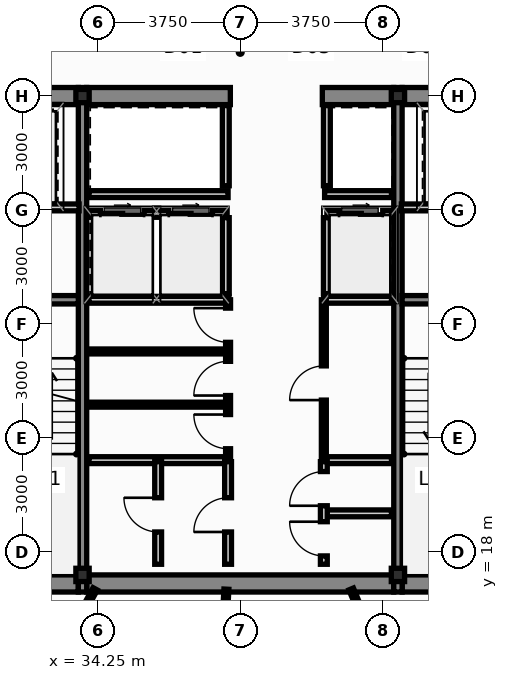
"""IFC4 building model, lengths in metres.
Left out: names, types, materials, properties, quantities, classifications, styles, units other than length and angle.
Written with IfcOpenShell. Run it as: python <this file> out.ifc"""

import sys

from ifc_helpers import new_model, si_unit, direction, frame, frame_2d, origin, origin_2d, place, context, subcontext, project, spatial, rectangle, hollow_rectangle, extrude, source, transform, mapped, element, fill, save


model = new_model("IFC4")
c1 = context("Model", 3, precision=1e-05, world=origin(), true_north=direction((0.0, 1.0)))
c2 = subcontext(c1, "Body", "Model", "MODEL_VIEW")
j1 = project(units=[si_unit("LENGTHUNIT", "METRE"), si_unit("PLANEANGLEUNIT", "RADIAN")], contexts=[c1])
p1 = place(None, origin())
s1 = spatial("IfcSite", under=j1, at=p1, CompositionType="ELEMENT")
p2 = place(p1, origin())
s2 = spatial("IfcBuilding", under=s1, at=p2, CompositionType="ELEMENT")
p3 = place(p2, frame((0.0, 0.0, 191.35)))
s3 = spatial("IfcBuildingStorey", under=s2, at=p3, CompositionType="ELEMENT", Elevation=191.35)
m1 = source(origin(), c2, "Body", "SweptSolid", [
    extrude(hollow_rectangle(XDim=0.35, YDim=0.35, WallThickness=0.016, at=origin_2d()), origin(), (0.0, 0.0, 1.0), 3.65),
])
for number, where, z_axis, x_axis in (
    (1, (33.85, 17.4, 0.0), (0.0, 0.0, 1.0), (1.0, 0.0, 0.0)),
    (2, (42.15, 17.4, 0.0), (0.0, 0.0, 1.0), (1.0, 0.0, 0.0)),
    (3, (33.85, 30.0, 0.0), (0.0, 0.0, 1.0), (1.0, 0.0, 0.0)),
    (4, (42.15, 30.0, 0.0), (0.0, 0.0, 1.0), (1.0, 0.0, 0.0)),
):
    element("IfcColumn", number, at=place(p3, frame(where, z_axis=z_axis, x_axis=x_axis)), inside=s3, PredefinedType="COLUMN", context=c2, shape_type="MappedRepresentation", body=[
        mapped(m1, transform((0.0, 0.0, 0.0), scale=1.0)),
    ])
p4 = place(p3, frame((30.84, 17.175, 0.0), z_axis=(0.0, 0.0, 1.0), x_axis=(1.0, 0.0, 0.0)))
e5 = element("IfcWall", 5, at=p4, inside=s3, PredefinedType="SHEAR", context=c2, shape_type="SweptSolid", body=[
    extrude(rectangle(XDim=2.9, YDim=0.45, at=frame_2d((1.45, 0.0))), origin(), (0.0, 0.0, 1.0), 3.65),
])
p5 = place(p3, frame((33.96, 17.175, 0.0), z_axis=(0.0, 0.0, 1.0), x_axis=(1.0, 0.0, 0.0)))
e6 = element("IfcWall", 6, at=p5, inside=s3, PredefinedType="SHEAR", context=c2, shape_type="SweptSolid", body=[
    extrude(rectangle(XDim=8.08, YDim=0.45, at=frame_2d((4.04, 0.0))), origin(), (0.0, 0.0, 1.0), 3.65),
])
for number, where, z_axis, x_axis in (
    (7, (42.26, 17.175, 0.0), (0.0, 0.0, 1.0), (1.0, 0.0, 0.0)),
    (8, (30.84, 30.0, 0.0), (0.0, 0.0, 1.0), (1.0, 0.0, 0.0)),
):
    element("IfcWall", number, at=place(p3, frame(where, z_axis=z_axis, x_axis=x_axis)), inside=s3, PredefinedType="SHEAR", context=c2, shape_type="SweptSolid", body=[
        extrude(rectangle(XDim=2.9, YDim=0.45, at=frame_2d((1.45, 0.0))), origin(), (0.0, 0.0, 1.0), 3.65),
    ])
p6 = place(p3, frame((33.96, 30.0, 0.0), z_axis=(0.0, 0.0, 1.0), x_axis=(1.0, 0.0, 0.0)))
e9 = element("IfcWall", 9, at=p6, inside=s3, PredefinedType="SHEAR", context=c2, shape_type="SweptSolid", body=[
    extrude(rectangle(XDim=3.78, YDim=0.45, at=frame_2d((1.89, 0.0))), origin(), (0.0, 0.0, 1.0), 3.65),
])
p7 = place(p3, frame((40.16, 30.0, 0.0), z_axis=(0.0, 0.0, 1.0), x_axis=(1.0, 0.0, 0.0)))
e10 = element("IfcWall", 10, at=p7, inside=s3, PredefinedType="SHEAR", context=c2, shape_type="SweptSolid", body=[
    extrude(rectangle(XDim=1.88, YDim=0.45, at=frame_2d((0.94, 0.0))), origin(), (0.0, 0.0, 1.0), 3.65),
])
p8 = place(p3, frame((42.26, 30.0, 0.0), z_axis=(0.0, 0.0, 1.0), x_axis=(1.0, 0.0, 0.0)))
e11 = element("IfcWall", 11, at=p8, inside=s3, PredefinedType="SHEAR", context=c2, shape_type="SweptSolid", body=[
    extrude(rectangle(XDim=2.9, YDim=0.45, at=frame_2d((1.45, 0.0))), origin(), (0.0, 0.0, 1.0), 3.65),
])
for number, where, z_axis, x_axis in (
    (12, (33.85, 16.95, 0.0), (0.0, 0.0, 1.0), (0.0, 1.0, 0.0)),
    (13, (42.15, 16.95, 0.0), (0.0, 0.0, 1.0), (0.0, 1.0, 0.0)),
):
    element("IfcWall", number, at=place(p3, frame(where, z_axis=z_axis, x_axis=x_axis)), inside=s3, PredefinedType="SHEAR", context=c2, shape_type="SweptSolid", body=[
        extrude(rectangle(XDim=13.275, YDim=0.22, at=frame_2d((6.638, 0.0))), origin(), (0.0, 0.0, 1.0), 3.65),
    ])
for number, where, z_axis, x_axis in (
    (14, (30.84, 24.64, 0.0), (0.0, 0.0, 1.0), (1.0, 0.0, 0.0)),
    (15, (42.26, 24.64, 0.0), (0.0, 0.0, 1.0), (1.0, 0.0, 0.0)),
):
    element("IfcWall", number, at=place(p3, frame(where, z_axis=z_axis, x_axis=x_axis)), inside=s3, PredefinedType="SHEAR", context=c2, shape_type="SweptSolid", body=[
        extrude(rectangle(XDim=2.9, YDim=0.22, at=frame_2d((1.45, 0.0))), origin(), (0.0, 0.0, 1.0), 3.65),
    ])
p9 = place(p3, frame((34.02, 26.9, 0.0), z_axis=(0.0, 0.0, 1.0), x_axis=(1.0, 0.0, 0.0)))
e16 = element("IfcWall", 16, at=p9, inside=s3, PredefinedType="PARTITIONING", context=c2, shape_type="SweptSolid", body=[
    extrude(rectangle(XDim=3.6, YDim=0.18, at=frame_2d((1.8, 0.0))), origin(), (0.0, 0.0, 1.0), 3.4),
])
p10 = place(p9, frame((0.3, 0.0, 0.0)))
e17 = element("IfcOpeningElement", 17, at=p10, cuts=e16, PredefinedType="OPENING", context=c2, shape_type="SweptSolid", body=[
    extrude(rectangle(XDim=1.15, YDim=2.2, at=frame_2d((0.575, 1.1))), frame((0.0, 0.102, 0.0), z_axis=(0.0, -1.0, 0.0), x_axis=(1.0, 0.0, 0.0)), (0.0, 0.0, 1.0), 0.204),
])
p11 = place(p9, frame((2.1, 0.0, 0.0)))
e18 = element("IfcOpeningElement", 18, at=p11, cuts=e16, PredefinedType="OPENING", context=c2, shape_type="SweptSolid", body=[
    extrude(rectangle(XDim=1.15, YDim=2.2, at=frame_2d((0.575, 1.1))), frame((0.0, 0.102, 0.0), z_axis=(0.0, -1.0, 0.0), x_axis=(1.0, 0.0, 0.0)), (0.0, 0.0, 1.0), 0.204),
])
p12 = place(p3, frame((40.28, 26.9, 0.0), z_axis=(0.0, 0.0, 1.0), x_axis=(1.0, 0.0, 0.0)))
e19 = element("IfcWall", 19, at=p12, inside=s3, PredefinedType="PARTITIONING", context=c2, shape_type="SweptSolid", body=[
    extrude(rectangle(XDim=1.7, YDim=0.18, at=frame_2d((0.85, 0.0))), origin(), (0.0, 0.0, 1.0), 3.4),
])
p13 = place(p12, frame((0.32, 0.0, 0.0)))
e20 = element("IfcOpeningElement", 20, at=p13, cuts=e19, PredefinedType="OPENING", context=c2, shape_type="SweptSolid", body=[
    extrude(rectangle(XDim=1.15, YDim=2.2, at=frame_2d((0.575, 1.1))), frame((0.0, 0.102, 0.0), z_axis=(0.0, -1.0, 0.0), x_axis=(1.0, 0.0, 0.0)), (0.0, 0.0, 1.0), 0.204),
])
for number, where, z_axis, x_axis in (
    (21, (37.62, 24.8, 0.0), (0.0, 0.0, 1.0), (0.0, 1.0, 0.0)),
    (22, (40.28, 24.8, 0.0), (0.0, 0.0, 1.0), (0.0, 1.0, 0.0)),
):
    element("IfcWall", number, at=place(p3, frame(where, z_axis=z_axis, x_axis=x_axis)), inside=s3, PredefinedType="PARTITIONING", context=c2, shape_type="SweptSolid", body=[
        extrude(rectangle(XDim=2.0, YDim=0.18, at=frame_2d((1.0, 0.0))), origin(), (0.0, 0.0, 1.0), 3.4),
    ])
p14 = place(p3, frame((34.02, 24.64, 0.0), z_axis=(0.0, 0.0, 1.0), x_axis=(1.0, 0.0, 0.0)))
e23 = element("IfcWall", 23, at=p14, inside=s3, PredefinedType="PARTITIONING", context=c2, shape_type="SweptSolid", body=[
    extrude(rectangle(XDim=3.68, YDim=0.18, at=frame_2d((1.84, 0.0))), origin(), (0.0, 0.0, 1.0), 3.4),
])
p15 = place(p3, frame((40.2, 24.64, 0.0), z_axis=(0.0, 0.0, 1.0), x_axis=(1.0, 0.0, 0.0)))
e24 = element("IfcWall", 24, at=p15, inside=s3, PredefinedType="PARTITIONING", context=c2, shape_type="SweptSolid", body=[
    extrude(rectangle(XDim=1.78, YDim=0.18, at=frame_2d((0.89, 0.0))), origin(), (0.0, 0.0, 1.0), 3.4),
])
p16 = place(p3, frame((34.02, 27.42, 0.0), z_axis=(0.0, 0.0, 1.0), x_axis=(1.0, 0.0, 0.0)))
e25 = element("IfcWall", 25, at=p16, inside=s3, PredefinedType="PARTITIONING", context=c2, shape_type="SweptSolid", body=[
    extrude(rectangle(XDim=3.66, YDim=0.18, at=frame_2d((1.83, 0.0))), origin(), (0.0, 0.0, 1.0), 3.4),
])
p17 = place(p3, frame((40.22, 27.42, 0.0), z_axis=(0.0, 0.0, 1.0), x_axis=(1.0, 0.0, 0.0)))
e26 = element("IfcWall", 26, at=p17, inside=s3, PredefinedType="PARTITIONING", context=c2, shape_type="SweptSolid", body=[
    extrude(rectangle(XDim=1.76, YDim=0.18, at=frame_2d((0.88, 0.0))), origin(), (0.0, 0.0, 1.0), 3.4),
])
for number, where, z_axis, x_axis in (
    (27, (37.62, 27.64, 0.0), (0.0, 0.0, 1.0), (0.0, 1.0, 0.0)),
    (28, (40.28, 27.64, 0.0), (0.0, 0.0, 1.0), (0.0, 1.0, 0.0)),
):
    element("IfcWall", number, at=place(p3, frame(where, z_axis=z_axis, x_axis=x_axis)), inside=s3, PredefinedType="PARTITIONING", context=c2, shape_type="SweptSolid", body=[
        extrude(rectangle(XDim=2.11, YDim=0.18, at=frame_2d((1.055, 0.0))), origin(), (0.0, 0.0, 1.0), 3.4),
    ])
for number, where, z_axis, x_axis in (
    (29, (30.86, 27.07, 0.0), (0.0, 0.0, 1.0), (1.0, 0.0, 0.0)),
    (30, (42.24, 27.07, 0.0), (0.0, 0.0, 1.0), (1.0, 0.0, 0.0)),
):
    element("IfcWall", number, at=place(p3, frame(where, z_axis=z_axis, x_axis=x_axis)), inside=s3, PredefinedType="PARTITIONING", context=c2, shape_type="SweptSolid", body=[
        extrude(rectangle(XDim=2.9, YDim=0.18, at=frame_2d((1.45, 0.0))), origin(), (0.0, 0.0, 1.0), 3.4),
    ])
p18 = place(p3, frame((34.02, 20.42, 0.0), z_axis=(0.0, 0.0, 1.0), x_axis=(1.0, 0.0, 0.0)))
e31 = element("IfcWall", 31, at=p18, inside=s3, PredefinedType="PARTITIONING", context=c2, shape_type="SweptSolid", body=[
    extrude(rectangle(XDim=3.64, YDim=0.18, at=frame_2d((1.82, 0.0))), origin(), (0.0, 0.0, 1.0), 3.4),
])
p19 = place(p3, frame((40.22, 20.42, 0.0), z_axis=(0.0, 0.0, 1.0), x_axis=(1.0, 0.0, 0.0)))
e32 = element("IfcWall", 32, at=p19, inside=s3, PredefinedType="PARTITIONING", context=c2, shape_type="SweptSolid", body=[
    extrude(rectangle(XDim=1.76, YDim=0.18, at=frame_2d((0.88, 0.0))), origin(), (0.0, 0.0, 1.0), 3.4),
])
for number, where, z_axis, x_axis in (
    (33, (34.02, 21.88, 0.0), (0.0, 0.0, 1.0), (1.0, 0.0, 0.0)),
    (34, (34.02, 23.28, 0.0), (0.0, 0.0, 1.0), (1.0, 0.0, 0.0)),
):
    element("IfcWall", number, at=place(p3, frame(where, z_axis=z_axis, x_axis=x_axis)), inside=s3, PredefinedType="PARTITIONING", context=c2, shape_type="SweptSolid", body=[
        extrude(rectangle(XDim=3.58, YDim=0.13, at=frame_2d((1.79, 0.0))), origin(), (0.0, 0.0, 1.0), 3.4),
    ])
p20 = place(p3, frame((37.68, 20.5, 0.0), z_axis=(0.0, 0.0, 1.0), x_axis=(0.0, 1.0, 0.0)))
e35 = element("IfcWall", 35, at=p20, inside=s3, PredefinedType="PARTITIONING", context=c2, shape_type="SweptSolid", body=[
    extrude(rectangle(XDim=4.14, YDim=0.13, at=frame_2d((2.07, 0.0))), origin(), (0.0, 0.0, 1.0), 3.4),
])
p21 = place(p20, frame((0.22, 0.0, 0.0)))
e36 = element("IfcOpeningElement", 36, at=p21, cuts=e35, PredefinedType="OPENING", context=c2, shape_type="SweptSolid", body=[
    extrude(rectangle(XDim=0.9, YDim=2.1, at=frame_2d((0.45, 1.05))), frame((0.0, 0.077, 0.0), z_axis=(0.0, -1.0, 0.0), x_axis=(1.0, 0.0, 0.0)), (0.0, 0.0, 1.0), 0.154),
])
p22 = place(p20, frame((1.62, 0.0, 0.0)))
e37 = element("IfcOpeningElement", 37, at=p22, cuts=e35, PredefinedType="OPENING", context=c2, shape_type="SweptSolid", body=[
    extrude(rectangle(XDim=0.9, YDim=2.1, at=frame_2d((0.45, 1.05))), frame((0.0, 0.077, 0.0), z_axis=(0.0, -1.0, 0.0), x_axis=(1.0, 0.0, 0.0)), (0.0, 0.0, 1.0), 0.154),
])
p23 = place(p20, frame((3.02, 0.0, 0.0)))
e38 = element("IfcOpeningElement", 38, at=p23, cuts=e35, PredefinedType="OPENING", context=c2, shape_type="SweptSolid", body=[
    extrude(rectangle(XDim=0.9, YDim=2.1, at=frame_2d((0.45, 1.05))), frame((0.0, 0.077, 0.0), z_axis=(0.0, -1.0, 0.0), x_axis=(1.0, 0.0, 0.0)), (0.0, 0.0, 1.0), 0.154),
])
p24 = place(p3, frame((40.2, 20.5, 0.0), z_axis=(0.0, 0.0, 1.0), x_axis=(0.0, 1.0, 0.0)))
e39 = element("IfcWall", 39, at=p24, inside=s3, PredefinedType="PARTITIONING", context=c2, shape_type="SweptSolid", body=[
    extrude(rectangle(XDim=4.14, YDim=0.13, at=frame_2d((2.07, 0.0))), origin(), (0.0, 0.0, 1.0), 3.4),
])
p25 = place(p24, frame((1.5, 0.0, 0.0)))
e40 = element("IfcOpeningElement", 40, at=p25, cuts=e39, PredefinedType="OPENING", context=c2, shape_type="SweptSolid", body=[
    extrude(rectangle(XDim=0.9, YDim=2.1, at=frame_2d((0.45, 1.05))), frame((0.0, 0.077, 0.0), z_axis=(0.0, -1.0, 0.0), x_axis=(1.0, 0.0, 0.0)), (0.0, 0.0, 1.0), 0.154),
])
p26 = place(p3, frame((35.84, 17.68, 0.0), z_axis=(0.0, 0.0, 1.0), x_axis=(0.0, 1.0, 0.0)))
e41 = element("IfcWall", 41, at=p26, inside=s3, PredefinedType="PARTITIONING", context=c2, shape_type="SweptSolid", body=[
    extrude(rectangle(XDim=2.7, YDim=0.18, at=frame_2d((1.35, 0.0))), origin(), (0.0, 0.0, 1.0), 3.4),
])
p27 = place(p26, frame((0.85, 0.0, 0.0)))
e42 = element("IfcOpeningElement", 42, at=p27, cuts=e41, PredefinedType="OPENING", context=c2, shape_type="SweptSolid", body=[
    extrude(rectangle(XDim=0.9, YDim=2.1, at=frame_2d((0.45, 1.05))), frame((0.0, 0.102, 0.0), z_axis=(0.0, -1.0, 0.0), x_axis=(1.0, 0.0, 0.0)), (0.0, 0.0, 1.0), 0.204),
])
p28 = place(p3, frame((37.68, 17.68, 0.0), z_axis=(0.0, 0.0, 1.0), x_axis=(0.0, 1.0, 0.0)))
e43 = element("IfcWall", 43, at=p28, inside=s3, PredefinedType="PARTITIONING", context=c2, shape_type="SweptSolid", body=[
    extrude(rectangle(XDim=2.7, YDim=0.18, at=frame_2d((1.35, 0.0))), origin(), (0.0, 0.0, 1.0), 3.4),
])
p29 = place(p28, frame((0.85, 0.0, 0.0)))
e44 = element("IfcOpeningElement", 44, at=p29, cuts=e43, PredefinedType="OPENING", context=c2, shape_type="SweptSolid", body=[
    extrude(rectangle(XDim=0.9, YDim=2.1, at=frame_2d((0.45, 1.05))), frame((0.0, 0.102, 0.0), z_axis=(0.0, -1.0, 0.0), x_axis=(1.0, 0.0, 0.0)), (0.0, 0.0, 1.0), 0.204),
])
p30 = place(p3, frame((40.28, 19.02, 0.0), z_axis=(0.0, 0.0, 1.0), x_axis=(1.0, 0.0, 0.0)))
e45 = element("IfcWall", 45, at=p30, inside=s3, PredefinedType="PARTITIONING", context=c2, shape_type="SweptSolid", body=[
    extrude(rectangle(XDim=1.7, YDim=0.18, at=frame_2d((0.85, 0.0))), origin(), (0.0, 0.0, 1.0), 3.4),
])
p31 = place(p3, frame((40.2, 17.68, 0.0), z_axis=(0.0, 0.0, 1.0), x_axis=(0.0, 1.0, 0.0)))
e46 = element("IfcWall", 46, at=p31, inside=s3, PredefinedType="PARTITIONING", context=c2, shape_type="SweptSolid", body=[
    extrude(rectangle(XDim=2.7, YDim=0.18, at=frame_2d((1.35, 0.0))), origin(), (0.0, 0.0, 1.0), 3.4),
])
p32 = place(p31, frame((0.22, 0.0, 0.0)))
e47 = element("IfcOpeningElement", 47, at=p32, cuts=e46, PredefinedType="OPENING", context=c2, shape_type="SweptSolid", body=[
    extrude(rectangle(XDim=0.9, YDim=2.1, at=frame_2d((0.45, 1.05))), frame((0.0, 0.102, 0.0), z_axis=(0.0, -1.0, 0.0), x_axis=(1.0, 0.0, 0.0)), (0.0, 0.0, 1.0), 0.204),
])
p33 = place(p31, frame((1.54, 0.0, 0.0)))
e48 = element("IfcOpeningElement", 48, at=p33, cuts=e46, PredefinedType="OPENING", context=c2, shape_type="SweptSolid", body=[
    extrude(rectangle(XDim=0.9, YDim=2.1, at=frame_2d((0.45, 1.05))), frame((0.0, 0.102, 0.0), z_axis=(0.0, -1.0, 0.0), x_axis=(1.0, 0.0, 0.0)), (0.0, 0.0, 1.0), 0.204),
])
p34 = place(p3, frame((28.644, 6.909, 0.0), z_axis=(0.0, 0.0, 1.0), x_axis=(0.479998822193, 0.877269132418, 0.0)))
e49 = element("IfcWall", 49, at=p34, inside=s3, PredefinedType="PARTITIONING", context=c2, shape_type="SweptSolid", body=[
    extrude(rectangle(XDim=11.542, YDim=0.13, at=frame_2d((5.771, 0.0))), origin(), (0.0, 0.0, 1.0), 3.4),
])
p35 = place(p34, frame((5.347, 0.0, 0.0)))
e50 = element("IfcOpeningElement", 50, at=p35, cuts=e49, PredefinedType="OPENING", context=c2, shape_type="SweptSolid", body=[
    extrude(rectangle(XDim=0.96, YDim=2.15, at=frame_2d((0.48, 1.075))), frame((0.0, 0.077, 0.0), z_axis=(0.0, -1.0, 0.0), x_axis=(1.0, 0.0, 0.0)), (0.0, 0.0, 1.0), 0.154),
])
p36 = place(p3, frame((40.919, 17.031, 0.0), z_axis=(0.0, 0.0, 1.0), x_axis=(0.385652967591, -0.922643912129, 0.0)))
e51 = element("IfcWall", 51, at=p36, inside=s3, PredefinedType="PARTITIONING", context=c2, shape_type="SweptSolid", body=[
    extrude(rectangle(XDim=10.657, YDim=0.13, at=frame_2d((5.329, 0.0))), origin(), (0.0, 0.0, 1.0), 3.4),
])
p37 = place(p36, frame((4.902, 0.0, 0.0)))
e52 = element("IfcOpeningElement", 52, at=p37, cuts=e51, PredefinedType="OPENING", context=c2, shape_type="SweptSolid", body=[
    extrude(rectangle(XDim=0.96, YDim=2.15, at=frame_2d((0.48, 1.075))), frame((0.0, 0.077, 0.0), z_axis=(0.0, -1.0, 0.0), x_axis=(1.0, 0.0, 0.0)), (0.0, 0.0, 1.0), 0.154),
])
p38 = place(p3, frame((37.115, 7.059, 0.0), z_axis=(0.0, 0.0, 1.0), x_axis=(0.052204451421, 0.998636417948, 0.0)))
e53 = element("IfcWall", 53, at=p38, inside=s3, PredefinedType="PARTITIONING", context=c2, shape_type="SweptSolid", body=[
    extrude(rectangle(XDim=9.98, YDim=0.13, at=frame_2d((4.99, 0.0))), origin(), (0.0, 0.0, 1.0), 3.4),
])
p39 = place(p38, frame((4.559, 0.0, 0.0)))
e54 = element("IfcOpeningElement", 54, at=p39, cuts=e53, PredefinedType="OPENING", context=c2, shape_type="SweptSolid", body=[
    extrude(rectangle(XDim=0.96, YDim=2.15, at=frame_2d((0.48, 1.075))), frame((0.0, 0.077, 0.0), z_axis=(0.0, -1.0, 0.0), x_axis=(1.0, 0.0, 0.0)), (0.0, 0.0, 1.0), 0.154),
])
p40 = place(p10, origin())
e55 = element("IfcDoor", 55, at=p40, inside=s3, OperationType="SLIDING_TO_LEFT", PredefinedType="DOOR", context=c2, shape_type="SweptSolid", body=[
    extrude(rectangle(XDim=1.15, YDim=2.2, at=frame_2d((0.575, 1.1))), frame((0.0, 0.025, 0.0), z_axis=(0.0, -1.0, 0.0), x_axis=(1.0, 0.0, 0.0)), (0.0, 0.0, 1.0), 0.05),
])
fill(e17, e55)
p41 = place(p11, origin())
e56 = element("IfcDoor", 56, at=p41, inside=s3, OperationType="SLIDING_TO_RIGHT", PredefinedType="DOOR", context=c2, shape_type="SweptSolid", body=[
    extrude(rectangle(XDim=1.15, YDim=2.2, at=frame_2d((0.575, 1.1))), frame((0.0, 0.025, 0.0), z_axis=(0.0, -1.0, 0.0), x_axis=(1.0, 0.0, 0.0)), (0.0, 0.0, 1.0), 0.05),
])
fill(e18, e56)
p42 = place(p13, origin())
e57 = element("IfcDoor", 57, at=p42, inside=s3, OperationType="SLIDING_TO_LEFT", PredefinedType="DOOR", context=c2, shape_type="SweptSolid", body=[
    extrude(rectangle(XDim=1.15, YDim=2.2, at=frame_2d((0.575, 1.1))), frame((0.0, 0.025, 0.0), z_axis=(0.0, -1.0, 0.0), x_axis=(1.0, 0.0, 0.0)), (0.0, 0.0, 1.0), 0.05),
])
fill(e20, e57)
p43 = place(p21, origin())
e58 = element("IfcDoor", 58, at=p43, inside=s3, OperationType="SINGLE_SWING_RIGHT", PredefinedType="DOOR", context=c2, shape_type="SweptSolid", body=[
    extrude(rectangle(XDim=0.9, YDim=2.1, at=frame_2d((0.45, 1.05))), frame((0.0, 0.025, 0.0), z_axis=(0.0, -1.0, 0.0), x_axis=(1.0, 0.0, 0.0)), (0.0, 0.0, 1.0), 0.05),
])
fill(e36, e58)
p44 = place(p22, origin())
e59 = element("IfcDoor", 59, at=p44, inside=s3, OperationType="SINGLE_SWING_LEFT", PredefinedType="DOOR", context=c2, shape_type="SweptSolid", body=[
    extrude(rectangle(XDim=0.9, YDim=2.1, at=frame_2d((0.45, 1.05))), frame((0.0, 0.025, 0.0), z_axis=(0.0, -1.0, 0.0), x_axis=(1.0, 0.0, 0.0)), (0.0, 0.0, 1.0), 0.05),
])
fill(e37, e59)
p45 = place(p23, origin())
e60 = element("IfcDoor", 60, at=p45, inside=s3, OperationType="SINGLE_SWING_RIGHT", PredefinedType="DOOR", context=c2, shape_type="SweptSolid", body=[
    extrude(rectangle(XDim=0.9, YDim=2.1, at=frame_2d((0.45, 1.05))), frame((0.0, 0.025, 0.0), z_axis=(0.0, -1.0, 0.0), x_axis=(1.0, 0.0, 0.0)), (0.0, 0.0, 1.0), 0.05),
])
fill(e38, e60)
p46 = place(p25, origin())
e61 = element("IfcDoor", 61, at=p46, inside=s3, OperationType="SINGLE_SWING_LEFT", PredefinedType="DOOR", context=c2, shape_type="SweptSolid", body=[
    extrude(rectangle(XDim=0.9, YDim=2.1, at=frame_2d((0.45, 1.05))), frame((0.0, 0.025, 0.0), z_axis=(0.0, -1.0, 0.0), x_axis=(1.0, 0.0, 0.0)), (0.0, 0.0, 1.0), 0.05),
])
fill(e40, e61)
p47 = place(p27, origin())
e62 = element("IfcDoor", 62, at=p47, inside=s3, OperationType="SINGLE_SWING_RIGHT", PredefinedType="DOOR", context=c2, shape_type="SweptSolid", body=[
    extrude(rectangle(XDim=0.9, YDim=2.1, at=frame_2d((0.45, 1.05))), frame((0.0, 0.025, 0.0), z_axis=(0.0, -1.0, 0.0), x_axis=(1.0, 0.0, 0.0)), (0.0, 0.0, 1.0), 0.05),
])
fill(e42, e62)
p48 = place(p29, origin())
e63 = element("IfcDoor", 63, at=p48, inside=s3, OperationType="SINGLE_SWING_LEFT", PredefinedType="DOOR", context=c2, shape_type="SweptSolid", body=[
    extrude(rectangle(XDim=0.9, YDim=2.1, at=frame_2d((0.45, 1.05))), frame((0.0, 0.025, 0.0), z_axis=(0.0, -1.0, 0.0), x_axis=(1.0, 0.0, 0.0)), (0.0, 0.0, 1.0), 0.05),
])
fill(e44, e63)
p49 = place(p32, origin())
e64 = element("IfcDoor", 64, at=p49, inside=s3, OperationType="SINGLE_SWING_RIGHT", PredefinedType="DOOR", context=c2, shape_type="SweptSolid", body=[
    extrude(rectangle(XDim=0.9, YDim=2.1, at=frame_2d((0.45, 1.05))), frame((0.0, 0.025, 0.0), z_axis=(0.0, -1.0, 0.0), x_axis=(1.0, 0.0, 0.0)), (0.0, 0.0, 1.0), 0.05),
])
fill(e47, e64)
p50 = place(p33, origin())
e65 = element("IfcDoor", 65, at=p50, inside=s3, OperationType="SINGLE_SWING_LEFT", PredefinedType="DOOR", context=c2, shape_type="SweptSolid", body=[
    extrude(rectangle(XDim=0.9, YDim=2.1, at=frame_2d((0.45, 1.05))), frame((0.0, 0.025, 0.0), z_axis=(0.0, -1.0, 0.0), x_axis=(1.0, 0.0, 0.0)), (0.0, 0.0, 1.0), 0.05),
])
fill(e48, e65)
save(model, sys.argv[1])
